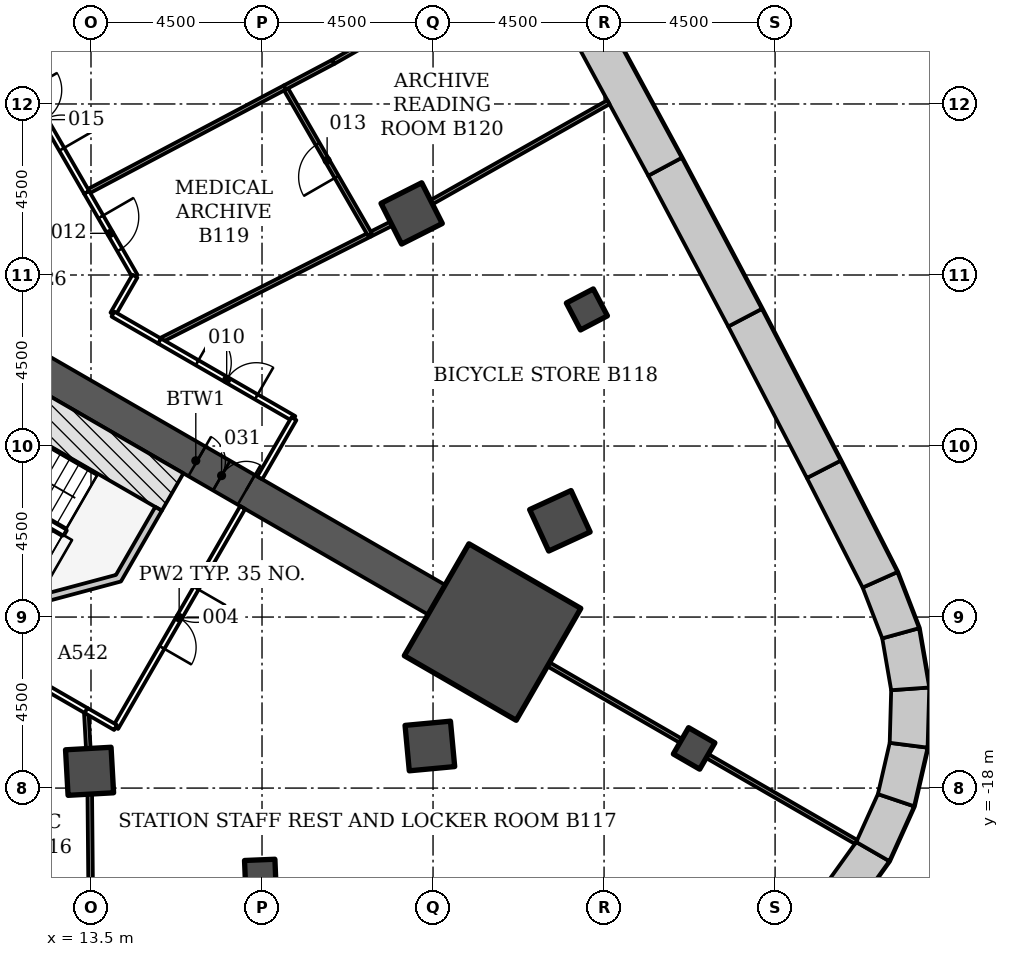
"""IFC4 building model, lengths in metres.
Left out: names, types, materials, properties, quantities, classifications, styles, units other than length and angle.
Written with IfcOpenShell. Run it as: python <this file> out.ifc"""

import sys

from ifc_helpers import new_model, si_unit, direction, frame, frame_2d, origin, origin_2d, place, context, subcontext, project, spatial, polyline, rectangle, outline, extrude, element, fill, save


model = new_model("IFC4")
c1 = context("Model", 3, precision=1e-05, world=origin(), true_north=direction((0.0, 1.0)))
c2 = subcontext(c1, "Body", "Model", "MODEL_VIEW")
j1 = project(units=[si_unit("LENGTHUNIT", "METRE"), si_unit("PLANEANGLEUNIT", "RADIAN")], contexts=[c1])
p1 = place(None, origin())
s1 = spatial("IfcSite", under=j1, at=p1, CompositionType="ELEMENT")
p2 = place(p1, origin())
s2 = spatial("IfcBuilding", under=s1, at=p2, CompositionType="ELEMENT")
p3 = place(p2, frame((0.0, 0.0, -4.5)))
s3 = spatial("IfcBuildingStorey", under=s2, at=p3, CompositionType="ELEMENT", Elevation=-4.5)
p4 = place(p3, origin())
e1 = element("IfcWall", 1, at=p4, inside=s3, PredefinedType="SOLIDWALL", context=c2, shape_type="SweptSolid", body=[
    extrude(outline(polyline([(33.582, -21.208), (34.506, -19.922), (33.635, -19.419), (32.828, -20.544), (33.582, -21.208)])), origin(), (0.0, 0.0, 1.0), 4.25),
])
p5 = place(p3, origin())
e2 = element("IfcWall", 2, at=p5, inside=s3, PredefinedType="SOLIDWALL", context=c2, shape_type="SweptSolid", body=[
    extrude(outline(polyline([(34.506, -19.922), (35.158, -18.479), (34.205, -18.158), (33.635, -19.419), (34.506, -19.922)])), origin(), (0.0, 0.0, 1.0), 4.25),
])
p6 = place(p3, origin())
e3 = element("IfcWall", 3, at=p6, inside=s3, PredefinedType="SOLIDWALL", context=c2, shape_type="SweptSolid", body=[
    extrude(outline(polyline([(35.158, -18.479), (35.513, -16.936), (34.516, -16.809), (34.205, -18.158), (35.158, -18.479)])), origin(), (0.0, 0.0, 1.0), 4.25),
])
p7 = place(p3, origin())
e4 = element("IfcWall", 4, at=p7, inside=s3, PredefinedType="SOLIDWALL", context=c2, shape_type="SweptSolid", body=[
    extrude(outline(polyline([(35.513, -16.936), (35.557, -15.353), (34.555, -15.425), (34.516, -16.809), (35.513, -16.936)])), origin(), (0.0, 0.0, 1.0), 4.25),
])
p8 = place(p3, origin())
e5 = element("IfcWall", 5, at=p8, inside=s3, PredefinedType="SOLIDWALL", context=c2, shape_type="SweptSolid", body=[
    extrude(outline(polyline([(35.557, -15.353), (35.289, -13.793), (34.32, -14.06), (34.555, -15.425), (35.557, -15.353)])), origin(), (0.0, 0.0, 1.0), 4.25),
])
p9 = place(p3, origin())
e6 = element("IfcWall", 6, at=p9, inside=s3, PredefinedType="SOLIDWALL", context=c2, shape_type="SweptSolid", body=[
    extrude(outline(polyline([(35.289, -13.793), (34.719, -12.316), (33.804, -12.724), (34.32, -14.06), (35.289, -13.793)])), origin(), (0.0, 0.0, 1.0), 4.25),
])
p10 = place(p3, origin())
e7 = element("IfcWall", 7, at=p10, inside=s3, PredefinedType="SOLIDWALL", context=c2, shape_type="SweptSolid", body=[
    extrude(outline(polyline([(34.719, -12.316), (33.226, -9.384), (32.337, -9.841), (33.804, -12.724), (34.719, -12.316)])), origin(), (0.0, 0.0, 1.0), 4.25),
])
p11 = place(p3, origin())
e8 = element("IfcWall", 8, at=p11, inside=s3, PredefinedType="SOLIDWALL", context=c2, shape_type="SweptSolid", body=[
    extrude(outline(polyline([(33.226, -9.384), (31.153, -5.39), (30.268, -5.854), (32.337, -9.841), (33.226, -9.384)])), origin(), (0.0, 0.0, 1.0), 4.25),
])
p12 = place(p3, origin())
e9 = element("IfcWall", 9, at=p12, inside=s3, PredefinedType="SOLIDWALL", context=c2, shape_type="SweptSolid", body=[
    extrude(outline(polyline([(31.153, -5.39), (29.045, -1.415), (28.164, -1.887), (30.268, -5.854), (31.153, -5.39)])), origin(), (0.0, 0.0, 1.0), 4.25),
])
p13 = place(p3, origin())
e10 = element("IfcWall", 10, at=p13, inside=s3, PredefinedType="SOLIDWALL", context=c2, shape_type="SweptSolid", body=[
    extrude(outline(polyline([(29.045, -1.415), (26.901, 2.542), (26.024, 2.062), (28.164, -1.887), (29.045, -1.415)])), origin(), (0.0, 0.0, 1.0), 4.25),
])
for number, where, z_axis, x_axis in (
    (11, (13.462, -17.558, -0.3), (0.0, 0.0, 1.0), (0.056, -0.998, 0.0)),
    (12, (22.417, -16.893, -0.3), (0.0, 0.0, 1.0), (0.093, -0.996, 0.0)),
    (13, (25.838, -10.967, -0.3), (0.0, 0.0, 1.0), (0.909, 0.418, 0.0)),
    (14, (21.937, -2.88, -0.3), (0.0, 0.0, 1.0), (0.893, 0.451, 0.0)),
):
    element("IfcColumn", number, at=place(p3, frame(where, z_axis=z_axis, x_axis=x_axis)), inside=s3, PredefinedType="COLUMN", context=c2, shape_type="SweptSolid", body=[
        extrude(rectangle(XDim=1.2, YDim=1.2, at=origin_2d()), origin(), (0.0, 0.0, 1.0), 4.55),
    ])
for number, where, z_axis, x_axis in (
    (15, (17.956, -20.288, -0.3), (0.0, 0.0, 1.0), (0.041, -0.999, 0.0)),
    (16, (29.37, -16.957, -0.3), (0.0, 0.0, 1.0), (0.866, -0.5, 0.0)),
    (17, (26.548, -5.406, -0.3), (0.0, 0.0, 1.0), (0.886, 0.464, 0.0)),
):
    element("IfcColumn", number, at=place(p3, frame(where, z_axis=z_axis, x_axis=x_axis)), inside=s3, PredefinedType="COLUMN", context=c2, shape_type="SweptSolid", body=[
        extrude(rectangle(XDim=0.8, YDim=0.8, at=origin_2d()), origin(), (0.0, 0.0, 1.0), 4.55),
    ])
p14 = place(p3, frame((9.922, -5.728, -0.3), z_axis=(0.0, 0.0, 1.0), x_axis=(0.866028046028, -0.499995423472, 0.0)))
e18 = element("IfcWall", 18, at=p14, inside=s3, PredefinedType="SHEAR", context=c2, shape_type="SweptSolid", body=[
    extrude(rectangle(XDim=14.633, YDim=0.9, at=frame_2d((7.316, 0.0))), origin(), (0.0, 0.0, 1.0), 4.55),
])
p15 = place(p14, frame((7.35, 0.0, 0.3)))
e19 = element("IfcOpeningElement", 19, at=p15, cuts=e18, PredefinedType="OPENING", context=c2, shape_type="SweptSolid", body=[
    extrude(rectangle(XDim=1.5, YDim=2.1, at=frame_2d((0.75, 1.05))), frame((0.0, 0.46, 0.0), z_axis=(0.0, -1.0, 0.0), x_axis=(1.0, 0.0, 0.0)), (0.0, 0.0, 1.0), 0.92),
])
p16 = place(p3, frame((24.066, -13.895, -0.3), z_axis=(0.0, 0.0, 1.0), x_axis=(0.866025403784, -0.5, 0.0)))
e20 = element("IfcColumn", 20, at=p16, inside=s3, PredefinedType="COLUMN", context=c2, shape_type="SweptSolid", body=[
    extrude(rectangle(XDim=3.4, YDim=3.4, at=origin_2d()), origin(), (0.0, 0.0, 1.0), 4.55),
])
p17 = place(p3, frame((9.413, -6.61, -0.3), z_axis=(0.0, 0.0, 1.0), x_axis=(0.866018442252, -0.500012057535, 0.0)))
e21 = element("IfcWall", 21, at=p17, inside=s3, PredefinedType="SHEAR", context=c2, shape_type="SweptSolid", body=[
    extrude(rectangle(XDim=7.2, YDim=1.136, at=frame_2d((3.6, 0.0))), origin(), (0.0, 0.0, 1.0), 4.55),
])
p18 = place(p3, frame((0.0, 0.0, -0.3)))
e22 = element("IfcWall", 22, at=p18, inside=s3, PredefinedType="SHEAR", context=c2, shape_type="SweptSolid", body=[
    extrude(outline(polyline([(12.104, -13.149), (14.289, -12.563), (15.364, -10.701), (15.191, -10.601), (14.157, -12.392), (12.132, -12.934), (12.204, -12.976), (12.204, -12.976), (12.204, -12.976), (12.204, -12.976), (12.204, -12.976), (12.204, -12.976), (12.204, -12.976), (12.204, -12.976), (12.204, -12.976), (12.204, -12.976), (12.204, -12.976), (12.204, -12.976), (12.204, -12.976), (12.204, -12.976), (12.204, -12.976), (12.204, -12.976), (12.204, -12.976), (12.104, -13.149)])), origin(), (0.0, 0.0, 1.0), 4.55),
])
p19 = place(p3, frame((13.429, -16.959, 0.0), z_axis=(0.0, 0.0, 1.0), x_axis=(-0.055009625476, 0.998485824188, 0.0)))
e23 = element("IfcWall", 23, at=p19, inside=s3, PredefinedType="PARTITIONING", context=c2, shape_type="SweptSolid", body=[
    extrude(rectangle(XDim=0.999, YDim=0.12, at=frame_2d((0.499, 0.0))), origin(), (0.0, 0.0, 1.0), 3.638),
])
p20 = place(p3, frame((13.517, -23.506, 0.0), z_axis=(0.0, 0.0, 1.0), x_axis=(-0.00917685765, 0.999957891755, 0.0)))
e24 = element("IfcWall", 24, at=p20, inside=s3, PredefinedType="PARTITIONING", context=c2, shape_type="SweptSolid", body=[
    extrude(rectangle(XDim=5.347, YDim=0.12, at=frame_2d((2.674, 0.0))), origin(), (0.0, 0.0, 1.0), 3.633),
])
p21 = place(p3, frame((13.377, -15.963, 0.0), z_axis=(0.0, 0.0, 1.0), x_axis=(-0.865969754012, 0.500096375847, 0.0)))
e25 = element("IfcWall", 25, at=p21, inside=s3, PredefinedType="PARTITIONING", context=c2, shape_type="SweptSolid", body=[
    extrude(rectangle(XDim=5.275, YDim=0.15, at=frame_2d((2.637, 0.0))), origin(), (0.0, 0.0, 1.0), 3.638),
])
p22 = place(p21, frame((2.15, 0.0, 0.0)))
e26 = element("IfcOpeningElement", 26, at=p22, cuts=e25, PredefinedType="OPENING", context=c2, shape_type="SweptSolid", body=[
    extrude(rectangle(XDim=1.0, YDim=2.1, at=frame_2d((0.5, 1.05))), frame((0.0, 0.085, 0.0), z_axis=(0.0, -1.0, 0.0), x_axis=(1.0, 0.0, 0.0)), (0.0, 0.0, 1.0), 0.17),
])
p23 = place(p3, frame((17.491, -10.618, 0.0), z_axis=(0.0, 0.0, 1.0), x_axis=(-0.499969057507, -0.866043267704, 0.0)))
e27 = element("IfcWall", 27, at=p23, inside=s3, PredefinedType="PARTITIONING", context=c2, shape_type="SweptSolid", body=[
    extrude(rectangle(XDim=6.685, YDim=0.15, at=frame_2d((3.342, 0.0))), origin(), (0.0, 0.0, 1.0), 3.638),
])
p24 = place(p23, frame((2.45, 0.0, 0.0)))
e28 = element("IfcOpeningElement", 28, at=p24, cuts=e27, PredefinedType="OPENING", context=c2, shape_type="SweptSolid", body=[
    extrude(rectangle(XDim=1.8, YDim=2.1, at=frame_2d((0.9, 1.05))), frame((0.0, 0.085, 0.0), z_axis=(0.0, -1.0, 0.0), x_axis=(1.0, 0.0, 0.0)), (0.0, 0.0, 1.0), 0.17),
])
p25 = place(p3, frame((14.147, -16.407, 0.0), z_axis=(0.0, 0.0, 1.0), x_axis=(-0.866276218641, 0.499565324075, 0.0)))
e29 = element("IfcWall", 29, at=p25, inside=s3, PredefinedType="PARTITIONING", context=c2, shape_type="SweptSolid", body=[
    extrude(rectangle(XDim=0.897, YDim=0.15, at=frame_2d((0.448, 0.0))), origin(), (0.0, 0.0, 1.0), 3.638),
])
p26 = place(p3, frame((29.023, -16.757, 0.0), z_axis=(0.0, 0.0, 1.0), x_axis=(-0.866027971625, 0.499995552344, 0.0)))
e30 = element("IfcWall", 30, at=p26, inside=s3, PredefinedType="PARTITIONING", context=c2, shape_type="SweptSolid", body=[
    extrude(rectangle(XDim=4.024, YDim=0.12, at=frame_2d((2.012, 0.0))), origin(), (0.0, 0.0, 1.0), 3.717),
])
p27 = place(p3, frame((33.634, -19.419, 0.0), z_axis=(0.0, 0.0, 1.0), x_axis=(-0.866032814021, 0.499987164874, 0.0)))
e31 = element("IfcWall", 31, at=p27, inside=s3, PredefinedType="PARTITIONING", context=c2, shape_type="SweptSolid", body=[
    extrude(rectangle(XDim=4.524, YDim=0.12, at=frame_2d((2.262, 0.0))), origin(), (0.0, 0.0, 1.0), 4.25),
])
p28 = place(p3, frame((20.836, -3.436, 0.0), z_axis=(0.0, 0.0, 1.0), x_axis=(-0.89244304116, -0.451160080554, 0.0)))
e32 = element("IfcWall", 32, at=p28, inside=s3, PredefinedType="PARTITIONING", context=c2, shape_type="SweptSolid", body=[
    extrude(rectangle(XDim=6.204, YDim=0.12, at=frame_2d((3.102, 0.0))), origin(), (0.0, 0.0, 1.0), 3.638),
])
p29 = place(p3, frame((21.401, -3.151, 0.0), z_axis=(0.0, 0.0, 1.0), x_axis=(-0.892323275748, -0.45139691133, 0.0)))
e33 = element("IfcWall", 33, at=p29, inside=s3, PredefinedType="PARTITIONING", context=c2, shape_type="SweptSolid", body=[
    extrude(rectangle(XDim=0.63, YDim=0.12, at=frame_2d((0.315, 0.0))), origin(), (0.0, 0.0, 1.0), 3.638),
])
p30 = place(p3, frame((27.116, 0.047, 0.0), z_axis=(0.0, 0.0, 1.0), x_axis=(-0.87056283872, -0.492057256668, 0.0)))
e34 = element("IfcWall", 34, at=p30, inside=s3, PredefinedType="PARTITIONING", context=c2, shape_type="SweptSolid", body=[
    extrude(rectangle(XDim=5.347, YDim=0.12, at=frame_2d((2.674, 0.0))), origin(), (0.0, 0.0, 1.0), 3.633),
])
p31 = place(p3, frame((15.295, -6.232, 0.0), z_axis=(0.0, 0.0, 1.0), x_axis=(0.865991915229, -0.500057999394, 0.0)))
e35 = element("IfcWall", 35, at=p31, inside=s3, PredefinedType="PARTITIONING", context=c2, shape_type="SweptSolid", body=[
    extrude(rectangle(XDim=4.094, YDim=0.15, at=frame_2d((2.047, 0.0))), origin(), (0.0, 0.0, 1.0), 3.638),
])
p32 = place(p31, frame((1.15, 0.0, 0.0)))
e36 = element("IfcOpeningElement", 36, at=p32, cuts=e35, PredefinedType="OPENING", context=c2, shape_type="SweptSolid", body=[
    extrude(rectangle(XDim=1.8, YDim=2.1, at=frame_2d((0.9, 1.05))), frame((0.0, 0.085, 0.0), z_axis=(0.0, -1.0, 0.0), x_axis=(1.0, 0.0, 0.0)), (0.0, 0.0, 1.0), 0.17),
])
p33 = place(p3, frame((18.84, -8.281, 0.0), z_axis=(0.0, 0.0, 1.0), x_axis=(-0.500126010714, -0.86595263924, 0.0)))
e37 = element("IfcWall", 37, at=p33, inside=s3, PredefinedType="PARTITIONING", context=c2, shape_type="SweptSolid", body=[
    extrude(rectangle(XDim=1.798, YDim=0.15, at=frame_2d((0.899, 0.0))), origin(), (0.0, 0.0, 1.0), 3.638),
])
p34 = place(p3, frame((20.838, -3.435, 0.0), z_axis=(0.0, 0.0, 1.0), x_axis=(-0.499911633214, 0.866076416361, 0.0)))
e38 = element("IfcWall", 38, at=p34, inside=s3, PredefinedType="PARTITIONING", context=c2, shape_type="SweptSolid", body=[
    extrude(rectangle(XDim=4.469, YDim=0.12, at=frame_2d((2.234, 0.0))), origin(), (0.0, 0.0, 1.0), 3.638),
])
p35 = place(p34, frame((1.75, 0.0, 0.0)))
e39 = element("IfcOpeningElement", 39, at=p35, cuts=e38, PredefinedType="OPENING", context=c2, shape_type="SweptSolid", body=[
    extrude(rectangle(XDim=1.0, YDim=2.1, at=frame_2d((0.5, 1.05))), frame((0.0, 0.07, 0.0), z_axis=(0.0, -1.0, 0.0), x_axis=(1.0, 0.0, 0.0)), (0.0, 0.0, 1.0), 0.14),
])
p36 = place(p3, frame((18.606, 0.437, 0.0), z_axis=(0.0, 0.0, 1.0), x_axis=(-0.884037119688, -0.467416699544, 0.0)))
e40 = element("IfcWall", 40, at=p36, inside=s3, PredefinedType="PARTITIONING", context=c2, shape_type="SweptSolid", body=[
    extrude(rectangle(XDim=5.907, YDim=0.12, at=frame_2d((2.954, 0.0))), origin(), (0.0, 0.0, 1.0), 3.638),
])
p37 = place(p3, frame((13.382, -2.321, 0.0), z_axis=(0.0, 0.0, 1.0), x_axis=(0.500076401611, -0.8659812888, 0.0)))
e41 = element("IfcWall", 41, at=p37, inside=s3, PredefinedType="PARTITIONING", context=c2, shape_type="SweptSolid", body=[
    extrude(rectangle(XDim=2.547, YDim=0.15, at=frame_2d((1.274, 0.0))), origin(), (0.0, 0.0, 1.0), 3.638),
])
p38 = place(p37, frame((0.75, 0.0, 0.0)))
e42 = element("IfcOpeningElement", 42, at=p38, cuts=e41, PredefinedType="OPENING", context=c2, shape_type="SweptSolid", body=[
    extrude(rectangle(XDim=1.0, YDim=2.1, at=frame_2d((0.5, 1.05))), frame((0.0, 0.085, 0.0), z_axis=(0.0, -1.0, 0.0), x_axis=(1.0, 0.0, 0.0)), (0.0, 0.0, 1.0), 0.17),
])
p39 = place(p3, frame((14.656, -4.529, 0.0), z_axis=(0.0, 0.0, 1.0), x_axis=(-0.500502949238, -0.865734831114, 0.0)))
e43 = element("IfcWall", 43, at=p39, inside=s3, PredefinedType="PARTITIONING", context=c2, shape_type="SweptSolid", body=[
    extrude(rectangle(XDim=1.155, YDim=0.15, at=frame_2d((0.578, 0.0))), origin(), (0.0, 0.0, 1.0), 4.25),
])
p40 = place(p3, frame((14.078, -5.529, 0.0), z_axis=(0.0, 0.0, 1.0), x_axis=(0.865984561414, -0.500070734389, 0.0)))
e44 = element("IfcWall", 44, at=p40, inside=s3, PredefinedType="PARTITIONING", context=c2, shape_type="SweptSolid", body=[
    extrude(rectangle(XDim=1.416, YDim=0.15, at=frame_2d((0.708, 0.0))), origin(), (0.0, 0.0, 1.0), 3.638),
])
p41 = place(p3, frame((21.959, 2.295, 0.0), z_axis=(0.0, 0.0, 1.0), x_axis=(-0.868831589773, -0.49510773435, 0.0)))
e45 = element("IfcWall", 45, at=p41, inside=s3, PredefinedType="PARTITIONING", context=c2, shape_type="SweptSolid", body=[
    extrude(rectangle(XDim=2.397, YDim=0.12, at=frame_2d((1.199, 0.0))), origin(), (0.0, 0.0, 1.0), 3.638),
])
p42 = place(p3, frame((19.875, 1.108, 0.0), z_axis=(0.0, 0.0, 1.0), x_axis=(-0.884108929341, -0.467280858863, 0.0)))
e46 = element("IfcWall", 46, at=p42, inside=s3, PredefinedType="PARTITIONING", context=c2, shape_type="SweptSolid", body=[
    extrude(rectangle(XDim=1.442, YDim=0.12, at=frame_2d((0.721, 0.0))), origin(), (0.0, 0.0, 1.0), 3.638),
])
p43 = place(p3, frame((11.205, 1.45, 0.0), z_axis=(0.0, 0.0, 1.0), x_axis=(0.500058412813, -0.865991676505, 0.0)))
e47 = element("IfcWall", 47, at=p43, inside=s3, PredefinedType="PARTITIONING", context=c2, shape_type="SweptSolid", body=[
    extrude(rectangle(XDim=4.361, YDim=0.15, at=frame_2d((2.181, 0.0))), origin(), (0.0, 0.0, 1.0), 3.638),
])
p44 = place(p43, frame((1.25, 0.0, 0.0)))
e48 = element("IfcOpeningElement", 48, at=p44, cuts=e47, PredefinedType="OPENING", context=c2, shape_type="SweptSolid", body=[
    extrude(rectangle(XDim=1.8, YDim=2.1, at=frame_2d((0.9, 1.05))), frame((0.0, 0.085, 0.0), z_axis=(0.0, -1.0, 0.0), x_axis=(1.0, 0.0, 0.0)), (0.0, 0.0, 1.0), 0.17),
])
p45 = place(p24, origin())
e49 = element("IfcDoor", 49, at=p45, inside=s3, OperationType="DOUBLE_DOOR_SINGLE_SWING", PredefinedType="DOOR", context=c2, shape_type="SweptSolid", body=[
    extrude(rectangle(XDim=1.8, YDim=2.1, at=frame_2d((0.9, 1.05))), frame((0.0, 0.025, 0.0), z_axis=(0.0, -1.0, 0.0), x_axis=(1.0, 0.0, 0.0)), (0.0, 0.0, 1.0), 0.05),
])
fill(e28, e49)
p46 = place(p32, origin())
e50 = element("IfcDoor", 50, at=p46, inside=s3, OperationType="DOUBLE_DOOR_SINGLE_SWING", PredefinedType="DOOR", context=c2, shape_type="SweptSolid", body=[
    extrude(rectangle(XDim=1.8, YDim=2.1, at=frame_2d((0.9, 1.05))), frame((0.0, 0.025, 0.0), z_axis=(0.0, -1.0, 0.0), x_axis=(1.0, 0.0, 0.0)), (0.0, 0.0, 1.0), 0.05),
])
fill(e36, e50)
p47 = place(p38, origin())
e51 = element("IfcDoor", 51, at=p47, inside=s3, OperationType="SINGLE_SWING_LEFT", PredefinedType="DOOR", context=c2, shape_type="SweptSolid", body=[
    extrude(rectangle(XDim=1.0, YDim=2.1, at=frame_2d((0.5, 1.05))), frame((0.0, 0.025, 0.0), z_axis=(0.0, -1.0, 0.0), x_axis=(1.0, 0.0, 0.0)), (0.0, 0.0, 1.0), 0.05),
])
fill(e42, e51)
p48 = place(p35, origin())
e52 = element("IfcDoor", 52, at=p48, inside=s3, OperationType="SINGLE_SWING_LEFT", PredefinedType="DOOR", context=c2, shape_type="SweptSolid", body=[
    extrude(rectangle(XDim=1.0, YDim=2.1, at=frame_2d((0.5, 1.05))), frame((0.0, 0.025, 0.0), z_axis=(0.0, -1.0, 0.0), x_axis=(1.0, 0.0, 0.0)), (0.0, 0.0, 1.0), 0.05),
])
fill(e39, e52)
p49 = place(p44, origin())
e53 = element("IfcDoor", 53, at=p49, inside=s3, OperationType="DOUBLE_DOOR_SINGLE_SWING", PredefinedType="DOOR", context=c2, shape_type="SweptSolid", body=[
    extrude(rectangle(XDim=1.8, YDim=2.1, at=frame_2d((0.9, 1.05))), frame((0.0, 0.025, 0.0), z_axis=(0.0, -1.0, 0.0), x_axis=(1.0, 0.0, 0.0)), (0.0, 0.0, 1.0), 0.05),
])
fill(e48, e53)
p50 = place(p15, origin())
e54 = element("IfcDoor", 54, at=p50, inside=s3, OperationType="DOUBLE_DOOR_SINGLE_SWING", PredefinedType="DOOR", context=c2, shape_type="SweptSolid", body=[
    extrude(rectangle(XDim=1.5, YDim=2.1, at=frame_2d((0.75, 1.05))), frame((0.0, 0.025, 0.0), z_axis=(0.0, -1.0, 0.0), x_axis=(1.0, 0.0, 0.0)), (0.0, 0.0, 1.0), 0.05),
])
fill(e19, e54)
save(model, sys.argv[1])
